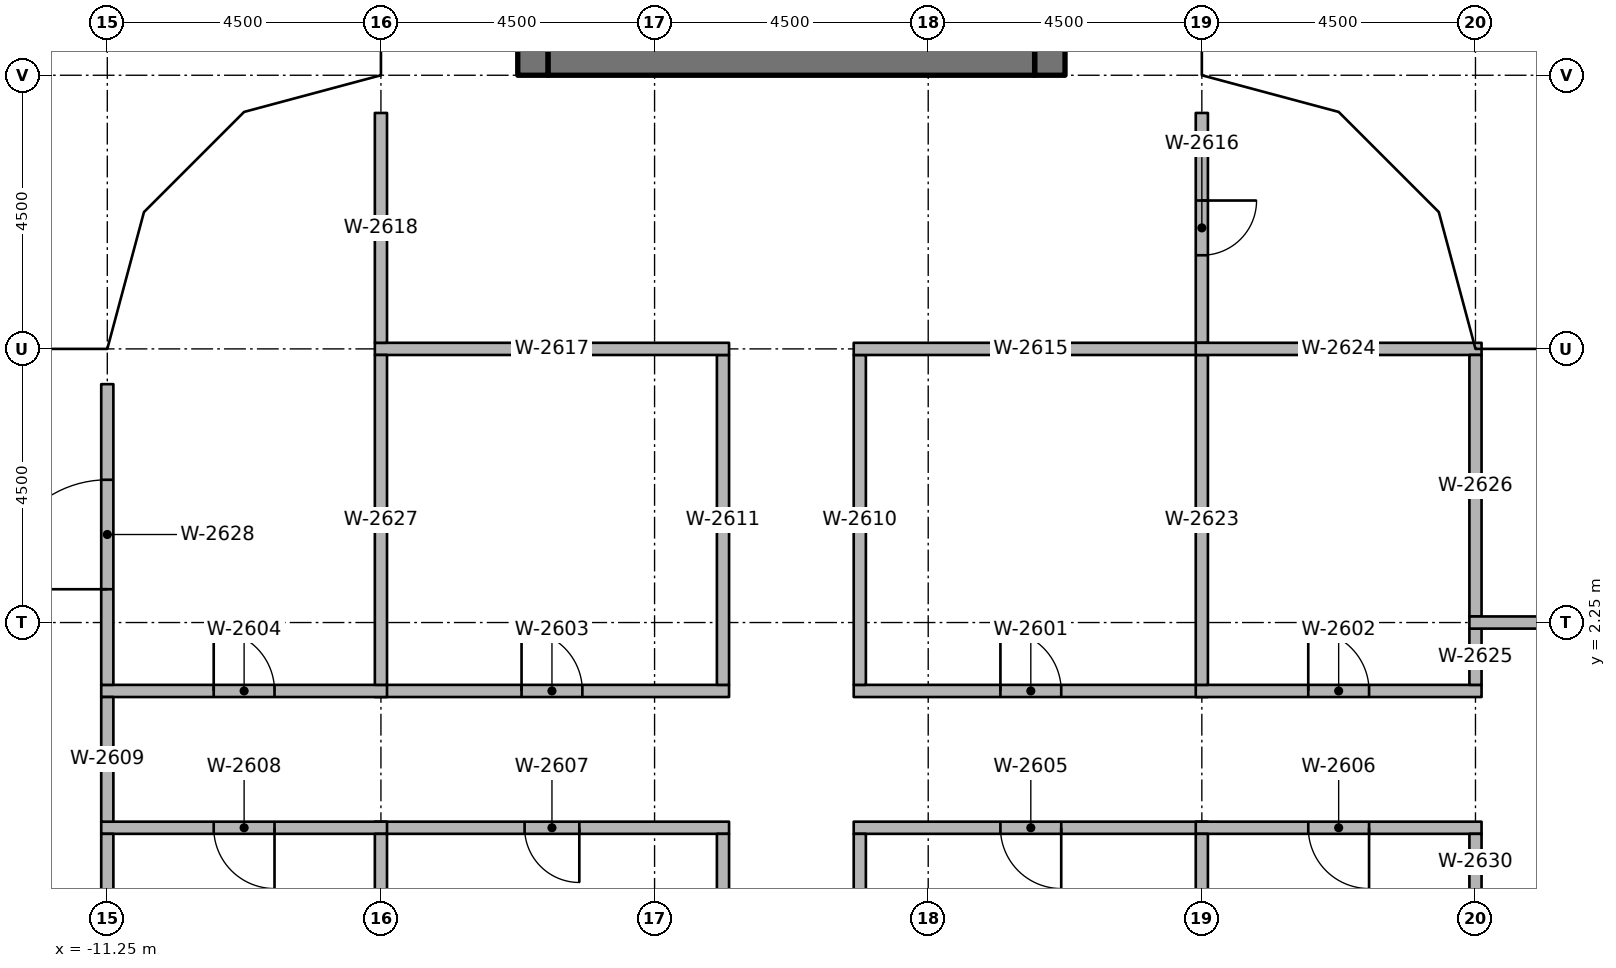
"""IFC4 building model, lengths in metres.
Left out: names, types, materials, properties, quantities, classifications, styles, units other than length and angle.
Written with IfcOpenShell. Run it as: python <this file> out.ifc"""

import sys

from ifc_helpers import new_model, si_unit, direction, frame, frame_2d, origin, origin_2d, place, context, subcontext, project, spatial, rectangle, extrude, element, fill, save


model = new_model("IFC4")
c1 = context("Model", 3, precision=1e-05, world=origin(), true_north=direction((0.0, 1.0)))
c2 = subcontext(c1, "Body", "Model", "MODEL_VIEW")
j1 = project(units=[si_unit("LENGTHUNIT", "METRE"), si_unit("PLANEANGLEUNIT", "RADIAN")], contexts=[c1])
p1 = place(None, origin())
s1 = spatial("IfcSite", under=j1, at=p1, CompositionType="ELEMENT")
p2 = place(p1, origin())
s2 = spatial("IfcBuilding", under=s1, at=p2, CompositionType="ELEMENT")
p3 = place(p2, frame((0.0, 0.0, 249.8)))
s3 = spatial("IfcBuildingStorey", under=s2, at=p3, CompositionType="ELEMENT", Elevation=249.8)
for number, where, z_axis, x_axis in (
    (1, (-10.75, 6.25, 0.0), (0.0, 0.0, 1.0), (1.0, 0.0, 0.0)),
    (2, (-6.25, 6.25, 0.0), (0.0, 0.0, 1.0), (1.0, 0.0, 0.0)),
    (3, (-6.25, 10.75, 0.0), (0.0, 0.0, 1.0), (1.0, 0.0, 0.0)),
    (4, (6.25, 6.25, 0.0), (0.0, 0.0, 1.0), (1.0, 0.0, 0.0)),
    (5, (6.25, 10.75, 0.0), (0.0, 0.0, 1.0), (1.0, 0.0, 0.0)),
    (6, (10.75, 6.25, 0.0), (0.0, 0.0, 1.0), (1.0, 0.0, 0.0)),
):
    element("IfcColumn", number, at=place(p3, frame(where, z_axis=z_axis, x_axis=x_axis)), inside=s3, PredefinedType="COLUMN", context=c2, shape_type="SweptSolid", body=[
        extrude(rectangle(XDim=0.6, YDim=0.6, at=origin_2d()), origin(), (0.0, 0.0, 1.0), 3.65),
    ])
p4 = place(p3, frame((-4.25, 11.25, 0.0), z_axis=(0.0, 0.0, 1.0), x_axis=(0.0, 1.0, 0.0)))
e7 = element("IfcWall", 7, at=p4, inside=s3, PredefinedType="SHEAR", context=c2, shape_type="SweptSolid", body=[
    extrude(rectangle(XDim=15.0, YDim=0.5, at=frame_2d((7.5, 0.0))), origin(), (0.0, 0.0, 1.0), 3.8),
])
p5 = place(p4, frame((7.15, 0.0, 0.0)))
e8 = element("IfcOpeningElement", 8, at=p5, cuts=e7, PredefinedType="OPENING", context=c2, shape_type="SweptSolid", body=[
    extrude(rectangle(XDim=1.5, YDim=2.3, at=frame_2d((0.75, 1.15))), frame((0.0, 0.26, 0.0), z_axis=(0.0, -1.0, 0.0), x_axis=(1.0, 0.0, 0.0)), (0.0, 0.0, 1.0), 0.52),
])
p6 = place(p4, frame((13.9, 0.0, 0.0)))
e9 = element("IfcOpeningElement", 9, at=p6, cuts=e7, PredefinedType="OPENING", context=c2, shape_type="SweptSolid", body=[
    extrude(rectangle(XDim=0.9, YDim=2.1, at=frame_2d((0.45, 1.05))), frame((0.0, 0.26, 0.0), z_axis=(0.0, -1.0, 0.0), x_axis=(1.0, 0.0, 0.0)), (0.0, 0.0, 1.0), 0.52),
])
p7 = place(p4, frame((1.15, 0.0, 0.0)))
e10 = element("IfcOpeningElement", 10, at=p7, cuts=e7, PredefinedType="OPENING", context=c2, shape_type="SweptSolid", body=[
    extrude(rectangle(XDim=1.2, YDim=2.1, at=frame_2d((0.6, 1.05))), frame((0.0, 0.26, 0.0), z_axis=(0.0, -1.0, 0.0), x_axis=(1.0, 0.0, 0.0)), (0.0, 0.0, 1.0), 0.52),
])
p8 = place(p3, frame((4.25, 11.25, 0.0), z_axis=(0.0, 0.0, 1.0), x_axis=(0.0, 1.0, 0.0)))
e11 = element("IfcWall", 11, at=p8, inside=s3, PredefinedType="SHEAR", context=c2, shape_type="SweptSolid", body=[
    extrude(rectangle(XDim=15.0, YDim=0.5, at=frame_2d((7.5, 0.0))), origin(), (0.0, 0.0, 1.0), 3.8),
])
p9 = place(p8, frame((7.15, 0.0, 0.0)))
e12 = element("IfcOpeningElement", 12, at=p9, cuts=e11, PredefinedType="OPENING", context=c2, shape_type="SweptSolid", body=[
    extrude(rectangle(XDim=1.5, YDim=2.3, at=frame_2d((0.75, 1.15))), frame((0.0, 0.26, 0.0), z_axis=(0.0, -1.0, 0.0), x_axis=(1.0, 0.0, 0.0)), (0.0, 0.0, 1.0), 0.52),
])
p10 = place(p8, frame((5.55, 0.0, 0.0)))
e13 = element("IfcOpeningElement", 13, at=p10, cuts=e11, PredefinedType="OPENING", context=c2, shape_type="SweptSolid", body=[
    extrude(rectangle(XDim=1.2, YDim=2.1, at=frame_2d((0.6, 1.05))), frame((0.0, 0.26, 0.0), z_axis=(0.0, -1.0, 0.0), x_axis=(1.0, 0.0, 0.0)), (0.0, 0.0, 1.0), 0.52),
])
p11 = place(p3, frame((-4.0, 11.5, 0.0), z_axis=(0.0, 0.0, 1.0), x_axis=(1.0, 0.0, 0.0)))
e14 = element("IfcWall", 14, at=p11, inside=s3, PredefinedType="SHEAR", context=c2, shape_type="SweptSolid", body=[
    extrude(rectangle(XDim=8.0, YDim=0.5, at=frame_2d((4.0, 0.0))), origin(), (0.0, 0.0, 1.0), 3.8),
])
p12 = place(p3, frame((1.025, 1.125, 0.0), z_axis=(0.0, 0.0, 1.0), x_axis=(1.0, 0.0, 0.0)))
e15 = element("IfcWall", 15, at=p12, inside=s3, PredefinedType="PARTITIONING", context=c2, shape_type="SweptSolid", body=[
    extrude(rectangle(XDim=5.825, YDim=0.2, at=frame_2d((2.913, 0.0))), origin(), (0.0, 0.0, 1.0), 2.75),
])
p13 = place(p12, frame((2.413, 0.0, 0.0)))
e16 = element("IfcOpeningElement", 16, at=p13, cuts=e15, PredefinedType="OPENING", context=c2, shape_type="SweptSolid", body=[
    extrude(rectangle(XDim=1.0, YDim=2.1, at=frame_2d((0.5, 1.05))), frame((0.0, 0.11, 0.0), z_axis=(0.0, -1.0, 0.0), x_axis=(1.0, 0.0, 0.0)), (0.0, 0.0, 1.0), 0.22),
])
p14 = place(p3, frame((6.65, 1.125, 0.0), z_axis=(0.0, 0.0, 1.0), x_axis=(1.0, 0.0, 0.0)))
e17 = element("IfcWall", 17, at=p14, inside=s3, PredefinedType="PARTITIONING", context=c2, shape_type="SweptSolid", body=[
    extrude(rectangle(XDim=4.7, YDim=0.2, at=frame_2d((2.35, 0.0))), origin(), (0.0, 0.0, 1.0), 2.75),
])
p15 = place(p14, frame((1.85, 0.0, 0.0)))
e18 = element("IfcOpeningElement", 18, at=p15, cuts=e17, PredefinedType="OPENING", context=c2, shape_type="SweptSolid", body=[
    extrude(rectangle(XDim=1.0, YDim=2.1, at=frame_2d((0.5, 1.05))), frame((0.0, 0.11, 0.0), z_axis=(0.0, -1.0, 0.0), x_axis=(1.0, 0.0, 0.0)), (0.0, 0.0, 1.0), 0.22),
])
p16 = place(p3, frame((-6.85, 1.125, 0.0), z_axis=(0.0, 0.0, 1.0), x_axis=(1.0, 0.0, 0.0)))
e19 = element("IfcWall", 19, at=p16, inside=s3, PredefinedType="PARTITIONING", context=c2, shape_type="SweptSolid", body=[
    extrude(rectangle(XDim=5.825, YDim=0.2, at=frame_2d((2.913, 0.0))), origin(), (0.0, 0.0, 1.0), 2.75),
])
p17 = place(p16, frame((2.413, 0.0, 0.0)))
e20 = element("IfcOpeningElement", 20, at=p17, cuts=e19, PredefinedType="OPENING", context=c2, shape_type="SweptSolid", body=[
    extrude(rectangle(XDim=1.0, YDim=2.1, at=frame_2d((0.5, 1.05))), frame((0.0, 0.11, 0.0), z_axis=(0.0, -1.0, 0.0), x_axis=(1.0, 0.0, 0.0)), (0.0, 0.0, 1.0), 0.22),
])
p18 = place(p3, frame((-11.35, 1.125, 0.0), z_axis=(0.0, 0.0, 1.0), x_axis=(1.0, 0.0, 0.0)))
e21 = element("IfcWall", 21, at=p18, inside=s3, PredefinedType="PARTITIONING", context=c2, shape_type="SweptSolid", body=[
    extrude(rectangle(XDim=4.7, YDim=0.2, at=frame_2d((2.35, 0.0))), origin(), (0.0, 0.0, 1.0), 2.75),
])
p19 = place(p18, frame((1.85, 0.0, 0.0)))
e22 = element("IfcOpeningElement", 22, at=p19, cuts=e21, PredefinedType="OPENING", context=c2, shape_type="SweptSolid", body=[
    extrude(rectangle(XDim=1.0, YDim=2.1, at=frame_2d((0.5, 1.05))), frame((0.0, 0.11, 0.0), z_axis=(0.0, -1.0, 0.0), x_axis=(1.0, 0.0, 0.0)), (0.0, 0.0, 1.0), 0.22),
])
p20 = place(p3, frame((6.85, -1.125, 0.0), z_axis=(0.0, 0.0, 1.0), x_axis=(-1.0, 0.0, 0.0)))
e23 = element("IfcWall", 23, at=p20, inside=s3, PredefinedType="PARTITIONING", context=c2, shape_type="SweptSolid", body=[
    extrude(rectangle(XDim=5.825, YDim=0.2, at=frame_2d((2.913, 0.0))), origin(), (0.0, 0.0, 1.0), 2.75),
])
p21 = place(p20, frame((2.413, 0.0, 0.0)))
e24 = element("IfcOpeningElement", 24, at=p21, cuts=e23, PredefinedType="OPENING", context=c2, shape_type="SweptSolid", body=[
    extrude(rectangle(XDim=1.0, YDim=2.1, at=frame_2d((0.5, 1.05))), frame((0.0, 0.11, 0.0), z_axis=(0.0, -1.0, 0.0), x_axis=(1.0, 0.0, 0.0)), (0.0, 0.0, 1.0), 0.22),
])
p22 = place(p3, frame((11.35, -1.125, 0.0), z_axis=(0.0, 0.0, 1.0), x_axis=(-1.0, 0.0, 0.0)))
e25 = element("IfcWall", 25, at=p22, inside=s3, PredefinedType="PARTITIONING", context=c2, shape_type="SweptSolid", body=[
    extrude(rectangle(XDim=4.7, YDim=0.2, at=frame_2d((2.35, 0.0))), origin(), (0.0, 0.0, 1.0), 2.75),
])
p23 = place(p22, frame((1.85, 0.0, 0.0)))
e26 = element("IfcOpeningElement", 26, at=p23, cuts=e25, PredefinedType="OPENING", context=c2, shape_type="SweptSolid", body=[
    extrude(rectangle(XDim=1.0, YDim=2.1, at=frame_2d((0.5, 1.05))), frame((0.0, 0.11, 0.0), z_axis=(0.0, -1.0, 0.0), x_axis=(1.0, 0.0, 0.0)), (0.0, 0.0, 1.0), 0.22),
])
p24 = place(p3, frame((-1.025, -1.125, 0.0), z_axis=(0.0, 0.0, 1.0), x_axis=(-1.0, 0.0, 0.0)))
e27 = element("IfcWall", 27, at=p24, inside=s3, PredefinedType="PARTITIONING", context=c2, shape_type="SweptSolid", body=[
    extrude(rectangle(XDim=5.825, YDim=0.2, at=frame_2d((2.913, 0.0))), origin(), (0.0, 0.0, 1.0), 2.75),
])
p25 = place(p24, frame((2.462, 0.0, 0.0)))
e28 = element("IfcOpeningElement", 28, at=p25, cuts=e27, PredefinedType="OPENING", context=c2, shape_type="SweptSolid", body=[
    extrude(rectangle(XDim=0.9, YDim=2.1, at=frame_2d((0.45, 1.05))), frame((0.0, 0.11, 0.0), z_axis=(0.0, -1.0, 0.0), x_axis=(1.0, 0.0, 0.0)), (0.0, 0.0, 1.0), 0.22),
])
p26 = place(p3, frame((-6.65, -1.125, 0.0), z_axis=(0.0, 0.0, 1.0), x_axis=(-1.0, 0.0, 0.0)))
e29 = element("IfcWall", 29, at=p26, inside=s3, PredefinedType="PARTITIONING", context=c2, shape_type="SweptSolid", body=[
    extrude(rectangle(XDim=4.7, YDim=0.2, at=frame_2d((2.35, 0.0))), origin(), (0.0, 0.0, 1.0), 2.75),
])
p27 = place(p26, frame((1.85, 0.0, 0.0)))
e30 = element("IfcOpeningElement", 30, at=p27, cuts=e29, PredefinedType="OPENING", context=c2, shape_type="SweptSolid", body=[
    extrude(rectangle(XDim=1.0, YDim=2.1, at=frame_2d((0.5, 1.05))), frame((0.0, 0.11, 0.0), z_axis=(0.0, -1.0, 0.0), x_axis=(1.0, 0.0, 0.0)), (0.0, 0.0, 1.0), 0.22),
])
p28 = place(p3, frame((-11.25, -1.025, 0.0), z_axis=(0.0, 0.0, 1.0), x_axis=(0.0, 1.0, 0.0)))
e31 = element("IfcWall", 31, at=p28, inside=s3, PredefinedType="PARTITIONING", context=c2, shape_type="SweptSolid", body=[
    extrude(rectangle(XDim=2.05, YDim=0.2, at=frame_2d((1.025, 0.0))), origin(), (0.0, 0.0, 1.0), 2.75),
])
for number, where, z_axis, x_axis in (
    (32, (1.125, 1.225, 0.0), (0.0, 0.0, 1.0), (0.0, 1.0, 0.0)),
    (33, (-1.125, 1.225, 0.0), (0.0, 0.0, 1.0), (0.0, 1.0, 0.0)),
    (34, (1.125, -6.65, 0.0), (0.0, 0.0, 1.0), (0.0, 1.0, 0.0)),
):
    element("IfcWall", number, at=place(p3, frame(where, z_axis=z_axis, x_axis=x_axis)), inside=s3, PredefinedType="PARTITIONING", context=c2, shape_type="SweptSolid", body=[
        extrude(rectangle(XDim=5.425, YDim=0.2, at=frame_2d((2.712, 0.0))), origin(), (0.0, 0.0, 1.0), 2.75),
    ])
p29 = place(p3, frame((-1.125, -3.9, 0.0), z_axis=(0.0, 0.0, 1.0), x_axis=(0.0, 1.0, 0.0)))
e35 = element("IfcWall", 35, at=p29, inside=s3, PredefinedType="PARTITIONING", context=c2, shape_type="SweptSolid", body=[
    extrude(rectangle(XDim=2.675, YDim=0.2, at=frame_2d((1.337, 0.0))), origin(), (0.0, 0.0, 1.0), 2.75),
])
p30 = place(p3, frame((1.025, 6.75, 0.0), z_axis=(0.0, 0.0, 1.0), x_axis=(1.0, 0.0, 0.0)))
e36 = element("IfcWall", 36, at=p30, inside=s3, PredefinedType="PARTITIONING", context=c2, shape_type="SweptSolid", body=[
    extrude(rectangle(XDim=5.825, YDim=0.2, at=frame_2d((2.913, 0.0))), origin(), (0.0, 0.0, 1.0), 2.75),
])
p31 = place(p3, frame((6.75, 10.63, 0.0), z_axis=(0.0, 0.0, 1.0), x_axis=(0.0, -1.0, 0.0)))
e37 = element("IfcWall", 37, at=p31, inside=s3, PredefinedType="PARTITIONING", context=c2, shape_type="SweptSolid", body=[
    extrude(rectangle(XDim=3.78, YDim=0.2, at=frame_2d((1.89, 0.0))), origin(), (0.0, 0.0, 1.0), 2.75),
])
p32 = place(p31, frame((1.44, 0.0, 0.0)))
e38 = element("IfcOpeningElement", 38, at=p32, cuts=e37, PredefinedType="OPENING", context=c2, shape_type="SweptSolid", body=[
    extrude(rectangle(XDim=0.9, YDim=2.1, at=frame_2d((0.45, 1.05))), frame((0.0, 0.11, 0.0), z_axis=(0.0, -1.0, 0.0), x_axis=(1.0, 0.0, 0.0)), (0.0, 0.0, 1.0), 0.22),
])
p33 = place(p3, frame((-6.85, 6.75, 0.0), z_axis=(0.0, 0.0, 1.0), x_axis=(1.0, 0.0, 0.0)))
e39 = element("IfcWall", 39, at=p33, inside=s3, PredefinedType="PARTITIONING", context=c2, shape_type="SweptSolid", body=[
    extrude(rectangle(XDim=5.825, YDim=0.2, at=frame_2d((2.913, 0.0))), origin(), (0.0, 0.0, 1.0), 2.75),
])
p34 = place(p3, frame((-6.75, 6.85, 0.0), z_axis=(0.0, 0.0, 1.0), x_axis=(0.0, 1.0, 0.0)))
e40 = element("IfcWall", 40, at=p34, inside=s3, PredefinedType="PARTITIONING", context=c2, shape_type="SweptSolid", body=[
    extrude(rectangle(XDim=3.78, YDim=0.2, at=frame_2d((1.89, 0.0))), origin(), (0.0, 0.0, 1.0), 2.75),
])
p35 = place(p3, frame((6.75, 1.225, 0.0), z_axis=(0.0, 0.0, 1.0), x_axis=(0.0, 1.0, 0.0)))
e41 = element("IfcWall", 41, at=p35, inside=s3, PredefinedType="PARTITIONING", context=c2, shape_type="SweptSolid", body=[
    extrude(rectangle(XDim=5.425, YDim=0.2, at=frame_2d((2.712, 0.0))), origin(), (0.0, 0.0, 1.0), 2.75),
])
p36 = place(p3, frame((6.65, 6.75, 0.0), z_axis=(0.0, 0.0, 1.0), x_axis=(1.0, 0.0, 0.0)))
e42 = element("IfcWall", 42, at=p36, inside=s3, PredefinedType="PARTITIONING", context=c2, shape_type="SweptSolid", body=[
    extrude(rectangle(XDim=4.7, YDim=0.2, at=frame_2d((2.35, 0.0))), origin(), (0.0, 0.0, 1.0), 2.75),
])
p37 = place(p3, frame((11.25, 1.225, 0.0), z_axis=(0.0, 0.0, 1.0), x_axis=(0.0, 1.0, 0.0)))
e43 = element("IfcWall", 43, at=p37, inside=s3, PredefinedType="PARTITIONING", context=c2, shape_type="SweptSolid", body=[
    extrude(rectangle(XDim=0.925, YDim=0.2, at=frame_2d((0.462, 0.0))), origin(), (0.0, 0.0, 1.0), 2.75),
])
p38 = place(p3, frame((11.25, 2.35, 0.0), z_axis=(0.0, 0.0, 1.0), x_axis=(0.0, 1.0, 0.0)))
e44 = element("IfcWall", 44, at=p38, inside=s3, PredefinedType="PARTITIONING", context=c2, shape_type="SweptSolid", body=[
    extrude(rectangle(XDim=4.3, YDim=0.2, at=frame_2d((2.15, 0.0))), origin(), (0.0, 0.0, 1.0), 2.75),
])
p39 = place(p3, frame((-6.75, 1.225, 0.0), z_axis=(0.0, 0.0, 1.0), x_axis=(0.0, 1.0, 0.0)))
e45 = element("IfcWall", 45, at=p39, inside=s3, PredefinedType="PARTITIONING", context=c2, shape_type="SweptSolid", body=[
    extrude(rectangle(XDim=5.425, YDim=0.2, at=frame_2d((2.712, 0.0))), origin(), (0.0, 0.0, 1.0), 2.75),
])
p40 = place(p3, frame((-11.25, 1.225, 0.0), z_axis=(0.0, 0.0, 1.0), x_axis=(0.0, 1.0, 0.0)))
e46 = element("IfcWall", 46, at=p40, inside=s3, PredefinedType="PARTITIONING", context=c2, shape_type="SweptSolid", body=[
    extrude(rectangle(XDim=4.945, YDim=0.2, at=frame_2d((2.472, 0.0))), origin(), (0.0, 0.0, 1.0), 2.75),
])
p41 = place(p40, frame((1.573, 0.0, 0.0)))
e47 = element("IfcOpeningElement", 47, at=p41, cuts=e46, PredefinedType="OPENING", context=c2, shape_type="SweptSolid", body=[
    extrude(rectangle(XDim=1.8, YDim=2.1, at=frame_2d((0.9, 1.05))), frame((0.0, 0.11, 0.0), z_axis=(0.0, -1.0, 0.0), x_axis=(1.0, 0.0, 0.0)), (0.0, 0.0, 1.0), 0.22),
])
p42 = place(p3, frame((6.75, -6.65, 0.0), z_axis=(0.0, 0.0, 1.0), x_axis=(0.0, 1.0, 0.0)))
e48 = element("IfcWall", 48, at=p42, inside=s3, PredefinedType="PARTITIONING", context=c2, shape_type="SweptSolid", body=[
    extrude(rectangle(XDim=5.425, YDim=0.2, at=frame_2d((2.712, 0.0))), origin(), (0.0, 0.0, 1.0), 2.75),
])
p43 = place(p3, frame((11.25, -2.15, 0.0), z_axis=(0.0, 0.0, 1.0), x_axis=(0.0, 1.0, 0.0)))
e49 = element("IfcWall", 49, at=p43, inside=s3, PredefinedType="PARTITIONING", context=c2, shape_type="SweptSolid", body=[
    extrude(rectangle(XDim=0.925, YDim=0.2, at=frame_2d((0.462, 0.0))), origin(), (0.0, 0.0, 1.0), 2.75),
])
p44 = place(p3, frame((-6.75, -3.9, 0.0), z_axis=(0.0, 0.0, 1.0), x_axis=(0.0, 1.0, 0.0)))
e50 = element("IfcWall", 50, at=p44, inside=s3, PredefinedType="PARTITIONING", context=c2, shape_type="SweptSolid", body=[
    extrude(rectangle(XDim=2.675, YDim=0.2, at=frame_2d((1.337, 0.0))), origin(), (0.0, 0.0, 1.0), 2.75),
])
p45 = place(p3, frame((-11.25, -6.17, 0.0), z_axis=(0.0, 0.0, 1.0), x_axis=(0.0, 1.0, 0.0)))
e51 = element("IfcWall", 51, at=p45, inside=s3, PredefinedType="PARTITIONING", context=c2, shape_type="SweptSolid", body=[
    extrude(rectangle(XDim=4.945, YDim=0.2, at=frame_2d((2.472, 0.0))), origin(), (0.0, 0.0, 1.0), 2.75),
])
p46 = place(p3, frame((11.15, 2.25, 0.0), z_axis=(0.0, 0.0, 1.0), x_axis=(1.0, 0.0, 0.0)))
e52 = element("IfcWall", 52, at=p46, inside=s3, PredefinedType="PARTITIONING", context=c2, shape_type="SweptSolid", body=[
    extrude(rectangle(XDim=4.7, YDim=0.2, at=frame_2d((2.35, 0.0))), origin(), (0.0, 0.0, 1.0), 2.75),
])
p47 = place(p46, frame((1.85, 0.0, 0.0)))
e53 = element("IfcOpeningElement", 53, at=p47, cuts=e52, PredefinedType="OPENING", context=c2, shape_type="SweptSolid", body=[
    extrude(rectangle(XDim=1.0, YDim=2.1, at=frame_2d((0.5, 1.05))), frame((0.0, 0.11, 0.0), z_axis=(0.0, -1.0, 0.0), x_axis=(1.0, 0.0, 0.0)), (0.0, 0.0, 1.0), 0.22),
])
p48 = place(p13, origin())
e54 = element("IfcDoor", 54, at=p48, inside=s3, OperationType="SINGLE_SWING_RIGHT", PredefinedType="DOOR", context=c2, shape_type="SweptSolid", body=[
    extrude(rectangle(XDim=1.0, YDim=2.1, at=frame_2d((0.5, 1.05))), frame((0.0, 0.025, 0.0), z_axis=(0.0, -1.0, 0.0), x_axis=(1.0, 0.0, 0.0)), (0.0, 0.0, 1.0), 0.05),
])
fill(e16, e54)
p49 = place(p15, origin())
e55 = element("IfcDoor", 55, at=p49, inside=s3, OperationType="SINGLE_SWING_RIGHT", PredefinedType="DOOR", context=c2, shape_type="SweptSolid", body=[
    extrude(rectangle(XDim=1.0, YDim=2.1, at=frame_2d((0.5, 1.05))), frame((0.0, 0.025, 0.0), z_axis=(0.0, -1.0, 0.0), x_axis=(1.0, 0.0, 0.0)), (0.0, 0.0, 1.0), 0.05),
])
fill(e18, e55)
p50 = place(p32, origin())
e56 = element("IfcDoor", 56, at=p50, inside=s3, OperationType="SINGLE_SWING_RIGHT", PredefinedType="DOOR", context=c2, shape_type="SweptSolid", body=[
    extrude(rectangle(XDim=0.9, YDim=2.1, at=frame_2d((0.45, 1.05))), frame((0.0, 0.025, 0.0), z_axis=(0.0, -1.0, 0.0), x_axis=(1.0, 0.0, 0.0)), (0.0, 0.0, 1.0), 0.05),
])
fill(e38, e56)
p51 = place(p17, origin())
e57 = element("IfcDoor", 57, at=p51, inside=s3, OperationType="SINGLE_SWING_RIGHT", PredefinedType="DOOR", context=c2, shape_type="SweptSolid", body=[
    extrude(rectangle(XDim=1.0, YDim=2.1, at=frame_2d((0.5, 1.05))), frame((0.0, 0.025, 0.0), z_axis=(0.0, -1.0, 0.0), x_axis=(1.0, 0.0, 0.0)), (0.0, 0.0, 1.0), 0.05),
])
fill(e20, e57)
p52 = place(p19, origin())
e58 = element("IfcDoor", 58, at=p52, inside=s3, OperationType="SINGLE_SWING_RIGHT", PredefinedType="DOOR", context=c2, shape_type="SweptSolid", body=[
    extrude(rectangle(XDim=1.0, YDim=2.1, at=frame_2d((0.5, 1.05))), frame((0.0, 0.025, 0.0), z_axis=(0.0, -1.0, 0.0), x_axis=(1.0, 0.0, 0.0)), (0.0, 0.0, 1.0), 0.05),
])
fill(e22, e58)
p53 = place(p21, origin())
e59 = element("IfcDoor", 59, at=p53, inside=s3, OperationType="SINGLE_SWING_RIGHT", PredefinedType="DOOR", context=c2, shape_type="SweptSolid", body=[
    extrude(rectangle(XDim=1.0, YDim=2.1, at=frame_2d((0.5, 1.05))), frame((0.0, 0.025, 0.0), z_axis=(0.0, -1.0, 0.0), x_axis=(1.0, 0.0, 0.0)), (0.0, 0.0, 1.0), 0.05),
])
fill(e24, e59)
p54 = place(p23, origin())
e60 = element("IfcDoor", 60, at=p54, inside=s3, OperationType="SINGLE_SWING_RIGHT", PredefinedType="DOOR", context=c2, shape_type="SweptSolid", body=[
    extrude(rectangle(XDim=1.0, YDim=2.1, at=frame_2d((0.5, 1.05))), frame((0.0, 0.025, 0.0), z_axis=(0.0, -1.0, 0.0), x_axis=(1.0, 0.0, 0.0)), (0.0, 0.0, 1.0), 0.05),
])
fill(e26, e60)
p55 = place(p25, origin())
e61 = element("IfcDoor", 61, at=p55, inside=s3, OperationType="SINGLE_SWING_RIGHT", PredefinedType="DOOR", context=c2, shape_type="SweptSolid", body=[
    extrude(rectangle(XDim=0.9, YDim=2.1, at=frame_2d((0.45, 1.05))), frame((0.0, 0.025, 0.0), z_axis=(0.0, -1.0, 0.0), x_axis=(1.0, 0.0, 0.0)), (0.0, 0.0, 1.0), 0.05),
])
fill(e28, e61)
p56 = place(p27, origin())
e62 = element("IfcDoor", 62, at=p56, inside=s3, OperationType="SINGLE_SWING_RIGHT", PredefinedType="DOOR", context=c2, shape_type="SweptSolid", body=[
    extrude(rectangle(XDim=1.0, YDim=2.1, at=frame_2d((0.5, 1.05))), frame((0.0, 0.025, 0.0), z_axis=(0.0, -1.0, 0.0), x_axis=(1.0, 0.0, 0.0)), (0.0, 0.0, 1.0), 0.05),
])
fill(e30, e62)
p57 = place(p41, origin())
e63 = element("IfcDoor", 63, at=p57, inside=s3, OperationType="DOUBLE_DOOR_SINGLE_SWING", PredefinedType="DOOR", context=c2, shape_type="SweptSolid", body=[
    extrude(rectangle(XDim=1.8, YDim=2.1, at=frame_2d((0.9, 1.05))), frame((0.0, 0.025, 0.0), z_axis=(0.0, -1.0, 0.0), x_axis=(1.0, 0.0, 0.0)), (0.0, 0.0, 1.0), 0.05),
])
fill(e47, e63)
save(model, sys.argv[1])
